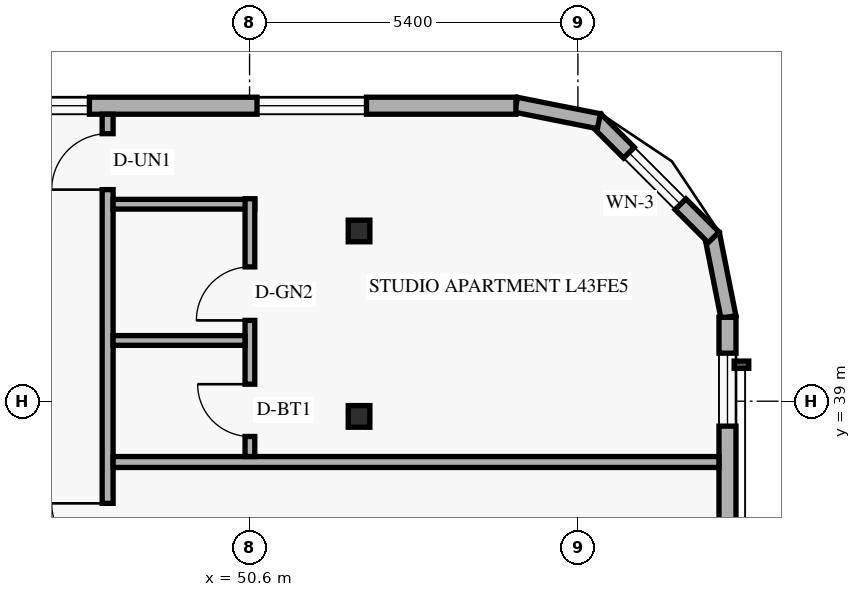
"""IFC4 building model, lengths in metres.
Left out: names, types, materials, properties, quantities, classifications, styles, units other than length and angle.
Written with IfcOpenShell. Run it as: python <this file> out.ifc"""

import sys

from ifc_helpers import new_model, si_unit, direction, frame, frame_2d, origin, origin_2d, place, context, subcontext, project, spatial, rectangle, hollow_rectangle, extrude, element, fill, save


model = new_model("IFC4")
c1 = context("Model", 3, precision=1e-05, world=origin(), true_north=direction((0.0, 1.0)))
c2 = subcontext(c1, "Body", "Model", "MODEL_VIEW")
j1 = project(units=[si_unit("LENGTHUNIT", "METRE"), si_unit("PLANEANGLEUNIT", "RADIAN")], contexts=[c1])
p1 = place(None, origin())
s1 = spatial("IfcSite", under=j1, at=p1, CompositionType="ELEMENT")
p2 = place(p1, origin())
s2 = spatial("IfcBuilding", under=s1, at=p2, CompositionType="ELEMENT")
p3 = place(p2, frame((0.0, 0.0, 166.2)))
s3 = spatial("IfcBuildingStorey", under=s2, at=p3, CompositionType="ELEMENT", Elevation=166.2)
for number, where, z_axis, x_axis in (
    (1, (52.296, 38.75, 0.0), (0.058, 0.0, 0.998), (0.0, 1.0, 0.0)),
    (2, (52.296, 41.8, 0.0), (0.058, 0.0, 0.998), (0.0, 1.0, 0.0)),
):
    element("IfcColumn", number, at=place(p3, frame(where, z_axis=z_axis, x_axis=x_axis)), inside=s3, PredefinedType="COLUMN", context=c2, shape_type="SweptSolid", body=[
        extrude(hollow_rectangle(XDim=0.356, YDim=0.356, WallThickness=0.016, at=origin_2d()), origin(), (0.0, 0.0, 1.0), 3.606),
    ])
p4 = place(p3, frame((58.476, 40.384, 0.0), z_axis=(0.0, 0.0, 1.0), x_axis=(-0.19496651342, 0.980809899341, 0.0)))
e3 = element("IfcWall", 3, at=p4, inside=s3, PredefinedType="SOLIDWALL", context=c2, shape_type="SweptSolid", body=[
    extrude(rectangle(XDim=1.389, YDim=0.25, at=frame_2d((0.694, 0.0))), origin(), (0.0, 0.0, 1.0), 3.36),
])
p5 = place(p3, frame((58.232, 41.695, 0.0), z_axis=(0.0, 0.0, 1.0), x_axis=(-0.707106781187, 0.707106781187, 0.0)))
e4 = element("IfcWall", 4, at=p5, inside=s3, PredefinedType="SOLIDWALL", context=c2, shape_type="SweptSolid", body=[
    extrude(rectangle(XDim=2.739, YDim=0.25, at=frame_2d((1.37, 0.0))), origin(), (0.0, 0.0, 1.0), 3.36),
])
p6 = place(p5, frame((0.77, 0.0, 0.85)))
e5 = element("IfcOpeningElement", 5, at=p6, cuts=e4, PredefinedType="OPENING", context=c2, shape_type="SweptSolid", body=[
    extrude(rectangle(XDim=1.2, YDim=1.5, at=frame_2d((0.6, 0.75))), frame((0.0, 0.135, 0.0), z_axis=(0.0, -1.0, 0.0), x_axis=(1.0, 0.0, 0.0)), (0.0, 0.0, 1.0), 0.27),
])
p7 = place(p3, frame((56.345, 43.605, 0.0), z_axis=(0.0, 0.0, 1.0), x_axis=(-0.980809899341, 0.19496651342, 0.0)))
e6 = element("IfcWall", 6, at=p7, inside=s3, PredefinedType="SOLIDWALL", context=c2, shape_type="SweptSolid", body=[
    extrude(rectangle(XDim=1.389, YDim=0.25, at=frame_2d((0.694, 0.0))), origin(), (0.0, 0.0, 1.0), 3.36),
])
p8 = place(p3, frame((58.46, 7.62, 0.0), z_axis=(0.0, 0.0, 1.0), x_axis=(0.0, 1.0, 0.0)))
e7 = element("IfcWall", 7, at=p8, inside=s3, PredefinedType="SOLIDWALL", context=c2, shape_type="SweptSolid", body=[
    extrude(rectangle(XDim=32.76, YDim=0.28, at=frame_2d((16.38, 0.0))), origin(), (0.0, 0.0, 1.0), 3.36),
])
p9 = place(p8, frame((1.79, 0.0, 0.85)))
e8 = element("IfcOpeningElement", 8, at=p9, cuts=e7, PredefinedType="OPENING", context=c2, shape_type="SweptSolid", body=[
    extrude(rectangle(XDim=1.2, YDim=1.5, at=frame_2d((0.6, 0.75))), frame((0.0, 0.15, 0.0), z_axis=(0.0, -1.0, 0.0), x_axis=(1.0, 0.0, 0.0)), (0.0, 0.0, 1.0), 0.3),
])
p10 = place(p8, frame((8.78, 0.0, 0.85)))
e9 = element("IfcOpeningElement", 9, at=p10, cuts=e7, PredefinedType="OPENING", context=c2, shape_type="SweptSolid", body=[
    extrude(rectangle(XDim=1.2, YDim=1.5, at=frame_2d((0.6, 0.75))), frame((0.0, 0.15, 0.0), z_axis=(0.0, -1.0, 0.0), x_axis=(1.0, 0.0, 0.0)), (0.0, 0.0, 1.0), 0.3),
])
p11 = place(p8, frame((16.325, 0.0, 0.85)))
e10 = element("IfcOpeningElement", 10, at=p11, cuts=e7, PredefinedType="OPENING", context=c2, shape_type="SweptSolid", body=[
    extrude(rectangle(XDim=1.2, YDim=1.5, at=frame_2d((0.6, 0.75))), frame((0.0, 0.15, 0.0), z_axis=(0.0, -1.0, 0.0), x_axis=(1.0, 0.0, 0.0)), (0.0, 0.0, 1.0), 0.3),
])
p12 = place(p8, frame((21.325, 0.0, 0.85)))
e11 = element("IfcOpeningElement", 11, at=p12, cuts=e7, PredefinedType="OPENING", context=c2, shape_type="SweptSolid", body=[
    extrude(rectangle(XDim=1.2, YDim=1.5, at=frame_2d((0.6, 0.75))), frame((0.0, 0.15, 0.0), z_axis=(0.0, -1.0, 0.0), x_axis=(1.0, 0.0, 0.0)), (0.0, 0.0, 1.0), 0.3),
])
p13 = place(p8, frame((26.58, 0.0, 0.85)))
e12 = element("IfcOpeningElement", 12, at=p13, cuts=e7, PredefinedType="OPENING", context=c2, shape_type="SweptSolid", body=[
    extrude(rectangle(XDim=1.2, YDim=1.5, at=frame_2d((0.6, 0.75))), frame((0.0, 0.15, 0.0), z_axis=(0.0, -1.0, 0.0), x_axis=(1.0, 0.0, 0.0)), (0.0, 0.0, 1.0), 0.3),
])
p14 = place(p8, frame((30.97, 0.0, 0.85)))
e13 = element("IfcOpeningElement", 13, at=p14, cuts=e7, PredefinedType="OPENING", context=c2, shape_type="SweptSolid", body=[
    extrude(rectangle(XDim=1.2, YDim=1.5, at=frame_2d((0.6, 0.75))), frame((0.0, 0.15, 0.0), z_axis=(0.0, -1.0, 0.0), x_axis=(1.0, 0.0, 0.0)), (0.0, 0.0, 1.0), 0.3),
])
p15 = place(p3, frame((54.98, 43.86, 0.0), z_axis=(0.0, 0.0, 1.0), x_axis=(-1.0, 0.0, 0.0)))
e14 = element("IfcWall", 14, at=p15, inside=s3, PredefinedType="SOLIDWALL", context=c2, shape_type="SweptSolid", body=[
    extrude(rectangle(XDim=33.76, YDim=0.28, at=frame_2d((16.88, 0.0))), origin(), (0.0, 0.0, 1.0), 3.36),
])
p16 = place(p15, frame((28.055, 0.0, 0.85)))
e15 = element("IfcOpeningElement", 15, at=p16, cuts=e14, PredefinedType="OPENING", context=c2, shape_type="SweptSolid", body=[
    extrude(rectangle(XDim=1.8, YDim=1.6, at=frame_2d((0.9, 0.8))), frame((0.0, 0.15, 0.0), z_axis=(0.0, -1.0, 0.0), x_axis=(1.0, 0.0, 0.0)), (0.0, 0.0, 1.0), 0.3),
])
p17 = place(p15, frame((21.17, 0.0, 0.85)))
e16 = element("IfcOpeningElement", 16, at=p17, cuts=e14, PredefinedType="OPENING", context=c2, shape_type="SweptSolid", body=[
    extrude(rectangle(XDim=1.8, YDim=1.6, at=frame_2d((0.9, 0.8))), frame((0.0, 0.15, 0.0), z_axis=(0.0, -1.0, 0.0), x_axis=(1.0, 0.0, 0.0)), (0.0, 0.0, 1.0), 0.3),
])
p18 = place(p15, frame((15.207, 0.0, 0.85)))
e17 = element("IfcOpeningElement", 17, at=p18, cuts=e14, PredefinedType="OPENING", context=c2, shape_type="SweptSolid", body=[
    extrude(rectangle(XDim=1.8, YDim=1.6, at=frame_2d((0.9, 0.8))), frame((0.0, 0.15, 0.0), z_axis=(0.0, -1.0, 0.0), x_axis=(1.0, 0.0, 0.0)), (0.0, 0.0, 1.0), 0.3),
])
p19 = place(p15, frame((9.684, 0.0, 0.85)))
e18 = element("IfcOpeningElement", 18, at=p19, cuts=e14, PredefinedType="OPENING", context=c2, shape_type="SweptSolid", body=[
    extrude(rectangle(XDim=1.8, YDim=1.6, at=frame_2d((0.9, 0.8))), frame((0.0, 0.15, 0.0), z_axis=(0.0, -1.0, 0.0), x_axis=(1.0, 0.0, 0.0)), (0.0, 0.0, 1.0), 0.3),
])
p20 = place(p15, frame((7.014, 0.0, 0.85)))
e19 = element("IfcOpeningElement", 19, at=p20, cuts=e14, PredefinedType="OPENING", context=c2, shape_type="SweptSolid", body=[
    extrude(rectangle(XDim=1.2, YDim=1.5, at=frame_2d((0.6, 0.75))), frame((0.0, 0.15, 0.0), z_axis=(0.0, -1.0, 0.0), x_axis=(1.0, 0.0, 0.0)), (0.0, 0.0, 1.0), 0.3),
])
p21 = place(p15, frame((2.457, 0.0, 0.85)))
e20 = element("IfcOpeningElement", 20, at=p21, cuts=e14, PredefinedType="OPENING", context=c2, shape_type="SweptSolid", body=[
    extrude(rectangle(XDim=1.8, YDim=1.6, at=frame_2d((0.9, 0.8))), frame((0.0, 0.15, 0.0), z_axis=(0.0, -1.0, 0.0), x_axis=(1.0, 0.0, 0.0)), (0.0, 0.0, 1.0), 0.3),
])
p22 = place(p3, frame((48.266, 4.28, 0.0), z_axis=(0.0, 0.0, 1.0), x_axis=(0.0, 1.0, 0.0)))
e21 = element("IfcWall", 21, at=p22, inside=s3, PredefinedType="STANDARD", context=c2, shape_type="SweptSolid", body=[
    extrude(rectangle(XDim=39.44, YDim=0.18, at=frame_2d((19.72, 0.0))), origin(), (0.0, 0.0, 1.0), 2.73),
])
p23 = place(p22, frame((2.18, 0.0, 0.0)))
e22 = element("IfcOpeningElement", 22, at=p23, cuts=e21, PredefinedType="OPENING", context=c2, shape_type="SweptSolid", body=[
    extrude(rectangle(XDim=0.92, YDim=2.15, at=frame_2d((0.46, 1.075))), frame((0.0, 0.1, 0.0), z_axis=(0.0, -1.0, 0.0), x_axis=(1.0, 0.0, 0.0)), (0.0, 0.0, 1.0), 0.2),
])
p24 = place(p22, frame((13.02, 0.0, 0.0)))
e23 = element("IfcOpeningElement", 23, at=p24, cuts=e21, PredefinedType="OPENING", context=c2, shape_type="SweptSolid", body=[
    extrude(rectangle(XDim=0.92, YDim=2.15, at=frame_2d((0.46, 1.075))), frame((0.0, 0.1, 0.0), z_axis=(0.0, -1.0, 0.0), x_axis=(1.0, 0.0, 0.0)), (0.0, 0.0, 1.0), 0.2),
])
p25 = place(p22, frame((22.32, 0.0, 0.0)))
e24 = element("IfcOpeningElement", 24, at=p25, cuts=e21, PredefinedType="OPENING", context=c2, shape_type="SweptSolid", body=[
    extrude(rectangle(XDim=0.92, YDim=2.15, at=frame_2d((0.46, 1.075))), frame((0.0, 0.1, 0.0), z_axis=(0.0, -1.0, 0.0), x_axis=(1.0, 0.0, 0.0)), (0.0, 0.0, 1.0), 0.2),
])
p26 = place(p22, frame((32.12, 0.0, 0.0)))
e25 = element("IfcOpeningElement", 25, at=p26, cuts=e21, PredefinedType="OPENING", context=c2, shape_type="SweptSolid", body=[
    extrude(rectangle(XDim=0.92, YDim=2.15, at=frame_2d((0.46, 1.075))), frame((0.0, 0.1, 0.0), z_axis=(0.0, -1.0, 0.0), x_axis=(1.0, 0.0, 0.0)), (0.0, 0.0, 1.0), 0.2),
])
p27 = place(p22, frame((38.2, 0.0, 0.0)))
e26 = element("IfcOpeningElement", 26, at=p27, cuts=e21, PredefinedType="OPENING", context=c2, shape_type="SweptSolid", body=[
    extrude(rectangle(XDim=0.92, YDim=2.15, at=frame_2d((0.46, 1.075))), frame((0.0, 0.1, 0.0), z_axis=(0.0, -1.0, 0.0), x_axis=(1.0, 0.0, 0.0)), (0.0, 0.0, 1.0), 0.2),
])
p28 = place(p3, frame((48.356, 38.0, 0.0), z_axis=(0.0, 0.0, 1.0), x_axis=(1.0, 0.0, 0.0)))
e27 = element("IfcWall", 27, at=p28, inside=s3, PredefinedType="PARTITIONING", context=c2, shape_type="SweptSolid", body=[
    extrude(rectangle(XDim=9.964, YDim=0.18, at=frame_2d((4.982, 0.0))), origin(), (0.0, 0.0, 1.0), 2.879),
])
p29 = place(p3, frame((48.356, 42.24, 0.0), z_axis=(0.0, 0.0, 1.0), x_axis=(1.0, 0.0, 0.0)))
e28 = element("IfcWall", 28, at=p29, inside=s3, PredefinedType="PLUMBINGWALL", context=c2, shape_type="SweptSolid", body=[
    extrude(rectangle(XDim=2.33, YDim=0.16, at=frame_2d((1.165, 0.0))), origin(), (0.0, 0.0, 1.0), 3.36),
])
p30 = place(p3, frame((50.606, 38.09, 0.0), z_axis=(0.0, 0.0, 1.0), x_axis=(0.0, 1.0, 0.0)))
e29 = element("IfcWall", 29, at=p30, inside=s3, PredefinedType="PLUMBINGWALL", context=c2, shape_type="SweptSolid", body=[
    extrude(rectangle(XDim=4.24, YDim=0.16, at=frame_2d((2.12, 0.0))), origin(), (0.0, 0.0, 1.0), 2.73),
])
p31 = place(p30, frame((0.33, 0.0, 0.0)))
e30 = element("IfcOpeningElement", 30, at=p31, cuts=e29, PredefinedType="OPENING", context=c2, shape_type="SweptSolid", body=[
    extrude(rectangle(XDim=0.86, YDim=2.12, at=frame_2d((0.43, 1.06))), frame((0.0, 0.09, 0.0), z_axis=(0.0, -1.0, 0.0), x_axis=(1.0, 0.0, 0.0)), (0.0, 0.0, 1.0), 0.18),
])
p32 = place(p30, frame((2.239, 0.0, 0.0)))
e31 = element("IfcOpeningElement", 31, at=p32, cuts=e29, PredefinedType="OPENING", context=c2, shape_type="SweptSolid", body=[
    extrude(rectangle(XDim=0.88, YDim=2.12, at=frame_2d((0.44, 1.06))), frame((0.0, 0.09, 0.0), z_axis=(0.0, -1.0, 0.0), x_axis=(1.0, 0.0, 0.0)), (0.0, 0.0, 1.0), 0.18),
])
p33 = place(p3, frame((48.356, 39.999, 0.0), z_axis=(0.0, 0.0, 1.0), x_axis=(1.0, 0.0, 0.0)))
e32 = element("IfcWall", 32, at=p33, inside=s3, PredefinedType="PLUMBINGWALL", context=c2, shape_type="SweptSolid", body=[
    extrude(rectangle(XDim=2.17, YDim=0.16, at=frame_2d((1.085, 0.0))), origin(), (0.0, 0.0, 1.0), 3.36),
])
p34 = place(p6, origin())
e33 = element("IfcWindow", 33, at=p34, inside=s3, PartitioningType="SINGLE_PANEL", PredefinedType="WINDOW", context=c2, shape_type="SweptSolid", body=[
    extrude(rectangle(XDim=1.2, YDim=1.5, at=frame_2d((0.6, 0.75))), frame((0.0, 0.03, 0.0), z_axis=(0.0, -1.0, 0.0), x_axis=(1.0, 0.0, 0.0)), (0.0, 0.0, 1.0), 0.06),
])
fill(e5, e33)
p35 = place(p14, origin())
e34 = element("IfcWindow", 34, at=p35, inside=s3, PartitioningType="SINGLE_PANEL", PredefinedType="WINDOW", context=c2, shape_type="SweptSolid", body=[
    extrude(rectangle(XDim=1.2, YDim=1.5, at=frame_2d((0.6, 0.75))), frame((0.0, 0.03, 0.0), z_axis=(0.0, -1.0, 0.0), x_axis=(1.0, 0.0, 0.0)), (0.0, 0.0, 1.0), 0.06),
])
fill(e13, e34)
p36 = place(p20, origin())
e35 = element("IfcWindow", 35, at=p36, inside=s3, PartitioningType="SINGLE_PANEL", PredefinedType="WINDOW", context=c2, shape_type="SweptSolid", body=[
    extrude(rectangle(XDim=1.2, YDim=1.5, at=frame_2d((0.6, 0.75))), frame((0.0, 0.03, 0.0), z_axis=(0.0, -1.0, 0.0), x_axis=(1.0, 0.0, 0.0)), (0.0, 0.0, 1.0), 0.06),
])
fill(e19, e35)
p37 = place(p21, origin())
e36 = element("IfcWindow", 36, at=p37, inside=s3, PartitioningType="SINGLE_PANEL", PredefinedType="WINDOW", context=c2, shape_type="SweptSolid", body=[
    extrude(rectangle(XDim=1.8, YDim=1.6, at=frame_2d((0.9, 0.8))), frame((0.0, 0.03, 0.0), z_axis=(0.0, -1.0, 0.0), x_axis=(1.0, 0.0, 0.0)), (0.0, 0.0, 1.0), 0.06),
])
fill(e20, e36)
p38 = place(p26, origin())
e37 = element("IfcDoor", 37, at=p38, inside=s3, OperationType="SINGLE_SWING_RIGHT", PredefinedType="DOOR", context=c2, shape_type="SweptSolid", body=[
    extrude(rectangle(XDim=0.92, YDim=2.15, at=frame_2d((0.46, 1.075))), frame((0.0, 0.025, 0.0), z_axis=(0.0, -1.0, 0.0), x_axis=(1.0, 0.0, 0.0)), (0.0, 0.0, 1.0), 0.05),
])
fill(e25, e37)
p39 = place(p27, origin())
e38 = element("IfcDoor", 38, at=p39, inside=s3, OperationType="SINGLE_SWING_LEFT", PredefinedType="DOOR", context=c2, shape_type="SweptSolid", body=[
    extrude(rectangle(XDim=0.92, YDim=2.15, at=frame_2d((0.46, 1.075))), frame((0.0, 0.025, 0.0), z_axis=(0.0, -1.0, 0.0), x_axis=(1.0, 0.0, 0.0)), (0.0, 0.0, 1.0), 0.05),
])
fill(e26, e38)
p40 = place(p31, origin())
e39 = element("IfcDoor", 39, at=p40, inside=s3, OperationType="SINGLE_SWING_RIGHT", PredefinedType="DOOR", context=c2, shape_type="SweptSolid", body=[
    extrude(rectangle(XDim=0.86, YDim=2.12, at=frame_2d((0.43, 1.06))), frame((0.0, 0.025, 0.0), z_axis=(0.0, -1.0, 0.0), x_axis=(1.0, 0.0, 0.0)), (0.0, 0.0, 1.0), 0.05),
])
fill(e30, e39)
p41 = place(p32, origin())
e40 = element("IfcDoor", 40, at=p41, inside=s3, OperationType="SINGLE_SWING_LEFT", PredefinedType="DOOR", context=c2, shape_type="SweptSolid", body=[
    extrude(rectangle(XDim=0.88, YDim=2.12, at=frame_2d((0.44, 1.06))), frame((0.0, 0.025, 0.0), z_axis=(0.0, -1.0, 0.0), x_axis=(1.0, 0.0, 0.0)), (0.0, 0.0, 1.0), 0.05),
])
fill(e31, e40)
save(model, sys.argv[1])
